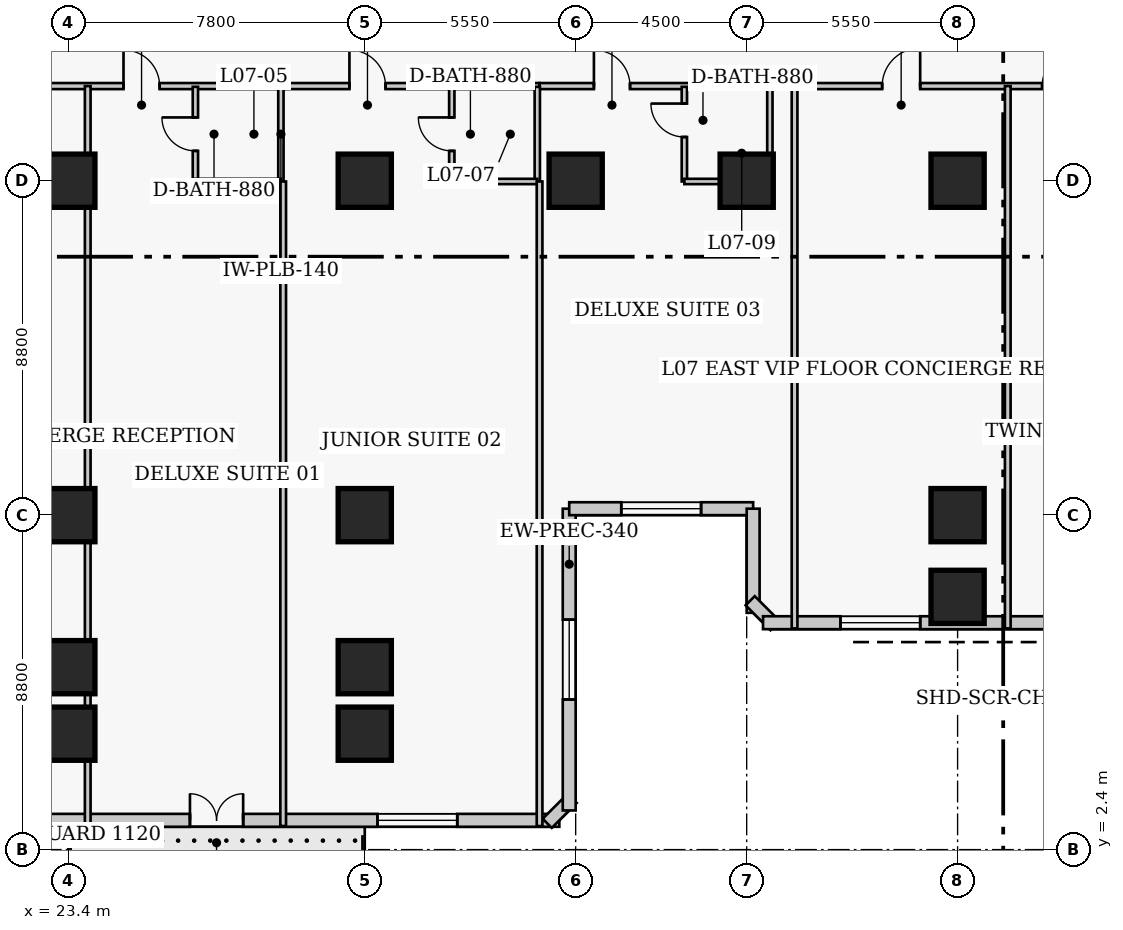
"""IFC4 building model, lengths in metres.
Left out: names, types, materials, properties, quantities, classifications, styles, units other than length and angle.
Written with IfcOpenShell. Run it as: python <this file> out.ifc"""

import sys

from ifc_helpers import new_model, si_unit, direction, frame, frame_2d, origin, origin_2d, place, context, subcontext, project, spatial, rectangle, extrude, element, fill, save


model = new_model("IFC4")
c1 = context("Model", 3, precision=1e-05, world=origin(), true_north=direction((0.0, 1.0)))
c2 = subcontext(c1, "Body", "Model", "MODEL_VIEW")
j1 = project(units=[si_unit("LENGTHUNIT", "METRE"), si_unit("PLANEANGLEUNIT", "RADIAN")], contexts=[c1])
p1 = place(None, origin())
s1 = spatial("IfcSite", under=j1, at=p1, CompositionType="ELEMENT")
p2 = place(p1, origin())
s2 = spatial("IfcBuilding", under=s1, at=p2, CompositionType="ELEMENT")
p3 = place(p2, frame((0.0, 0.0, 33.6)))
s3 = spatial("IfcBuildingStorey", under=s2, at=p3, CompositionType="ELEMENT", Elevation=33.6)
for number, where, z_axis, x_axis in (
    (1, (23.4, 11.2, 0.0), (0.0, 0.0, 1.0), (1.0, 0.0, 0.0)),
    (2, (23.4, 20.0, 0.0), (0.0, 0.0, 1.0), (1.0, 0.0, 0.0)),
    (3, (31.2, 11.2, 0.0), (0.0, 0.0, 1.0), (1.0, 0.0, 0.0)),
    (4, (31.2, 20.0, 0.0), (0.0, 0.0, 1.0), (1.0, 0.0, 0.0)),
    (5, (36.75, 20.0, 0.0), (0.0, 0.0, 1.0), (1.0, 0.0, 0.0)),
    (6, (41.25, 20.0, 0.0), (0.0, 0.0, 1.0), (1.0, 0.0, 0.0)),
    (7, (46.8, 11.2, 0.0), (0.0, 0.0, 1.0), (1.0, 0.0, 0.0)),
    (8, (46.8, 20.0, 0.0), (0.0, 0.0, 1.0), (1.0, 0.0, 0.0)),
    (9, (23.4, 7.2, 0.0), (0.0, 0.0, 1.0), (1.0, 0.0, 0.0)),
    (10, (31.2, 7.2, 0.0), (0.0, 0.0, 1.0), (1.0, 0.0, 0.0)),
    (11, (23.4, 5.45, 0.0), (0.0, 0.0, 1.0), (1.0, 0.0, 0.0)),
    (12, (31.2, 5.45, 0.0), (0.0, 0.0, 1.0), (1.0, 0.0, 0.0)),
    (13, (46.8, 9.05, 0.0), (0.0, 0.0, 1.0), (1.0, 0.0, 0.0)),
):
    element("IfcColumn", number, at=place(p3, frame(where, z_axis=z_axis, x_axis=x_axis)), inside=s3, PredefinedType="COLUMN", context=c2, shape_type="SweptSolid", body=[
        extrude(rectangle(XDim=1.4, YDim=1.4, at=origin_2d()), origin(), (0.0, 0.0, 1.0), 3.8),
    ])
p4 = place(p3, frame((6.43, 3.17, 0.0), z_axis=(0.0, 0.0, 1.0), x_axis=(1.0, 0.0, 0.0)))
e14 = element("IfcWall", 14, at=p4, inside=s3, PredefinedType="SOLIDWALL", context=c2, shape_type="SweptSolid", body=[
    extrude(rectangle(XDim=29.89, YDim=0.34, at=frame_2d((14.945, 0.0))), origin(), (0.0, 0.0, 1.0), 3.54),
])
p5 = place(p4, frame((20.17, 0.0, 0.0)))
e15 = element("IfcOpeningElement", 15, at=p5, cuts=e14, PredefinedType="OPENING", context=c2, shape_type="SweptSolid", body=[
    extrude(rectangle(XDim=1.4, YDim=2.15, at=frame_2d((0.7, 1.075))), frame((0.0, 0.18, 0.0), z_axis=(0.0, -1.0, 0.0), x_axis=(1.0, 0.0, 0.0)), (0.0, 0.0, 1.0), 0.36),
])
p6 = place(p4, frame((2.686, 0.0, 0.85)))
e16 = element("IfcOpeningElement", 16, at=p6, cuts=e14, PredefinedType="OPENING", context=c2, shape_type="SweptSolid", body=[
    extrude(rectangle(XDim=2.1, YDim=1.85, at=frame_2d((1.05, 0.925))), frame((0.0, 0.18, 0.0), z_axis=(0.0, -1.0, 0.0), x_axis=(1.0, 0.0, 0.0)), (0.0, 0.0, 1.0), 0.36),
])
p7 = place(p4, frame((10.809, 0.0, 0.85)))
e17 = element("IfcOpeningElement", 17, at=p7, cuts=e14, PredefinedType="OPENING", context=c2, shape_type="SweptSolid", body=[
    extrude(rectangle(XDim=2.1, YDim=1.85, at=frame_2d((1.05, 0.925))), frame((0.0, 0.18, 0.0), z_axis=(0.0, -1.0, 0.0), x_axis=(1.0, 0.0, 0.0)), (0.0, 0.0, 1.0), 0.36),
])
p8 = place(p4, frame((25.104, 0.0, 0.85)))
e18 = element("IfcOpeningElement", 18, at=p8, cuts=e14, PredefinedType="OPENING", context=c2, shape_type="SweptSolid", body=[
    extrude(rectangle(XDim=2.1, YDim=1.85, at=frame_2d((1.05, 0.925))), frame((0.0, 0.18, 0.0), z_axis=(0.0, -1.0, 0.0), x_axis=(1.0, 0.0, 0.0)), (0.0, 0.0, 1.0), 0.36),
])
p9 = place(p3, frame((36.001, 3.092, 0.0), z_axis=(0.0, 0.0, 1.0), x_axis=(0.707106781187, 0.707106781187, 0.0)))
e19 = element("IfcWall", 19, at=p9, inside=s3, PredefinedType="SOLIDWALL", context=c2, shape_type="SweptSolid", body=[
    extrude(rectangle(XDim=0.929, YDim=0.34, at=frame_2d((0.464, 0.0))), origin(), (0.0, 0.0, 1.0), 3.54),
])
p10 = place(p3, frame((36.58, 3.43, 0.0), z_axis=(0.0, 0.0, 1.0), x_axis=(0.0, 1.0, 0.0)))
e20 = element("IfcWall", 20, at=p10, inside=s3, PredefinedType="SOLIDWALL", context=c2, shape_type="SweptSolid", body=[
    extrude(rectangle(XDim=7.94, YDim=0.34, at=frame_2d((3.97, 0.0))), origin(), (0.0, 0.0, 1.0), 3.54),
])
p11 = place(p10, frame((2.92, 0.0, 0.85)))
e21 = element("IfcOpeningElement", 21, at=p11, cuts=e20, PredefinedType="OPENING", context=c2, shape_type="SweptSolid", body=[
    extrude(rectangle(XDim=2.1, YDim=1.85, at=frame_2d((1.05, 0.925))), frame((0.0, 0.18, 0.0), z_axis=(0.0, -1.0, 0.0), x_axis=(1.0, 0.0, 0.0)), (0.0, 0.0, 1.0), 0.36),
])
p12 = place(p3, frame((36.58, 11.37, 0.0), z_axis=(0.0, 0.0, 1.0), x_axis=(1.0, 0.0, 0.0)))
e22 = element("IfcWall", 22, at=p12, inside=s3, PredefinedType="SOLIDWALL", context=c2, shape_type="SweptSolid", body=[
    extrude(rectangle(XDim=4.84, YDim=0.34, at=frame_2d((2.42, 0.0))), origin(), (0.0, 0.0, 1.0), 3.54),
])
p13 = place(p12, frame((1.37, 0.0, 0.85)))
e23 = element("IfcOpeningElement", 23, at=p13, cuts=e22, PredefinedType="OPENING", context=c2, shape_type="SweptSolid", body=[
    extrude(rectangle(XDim=2.1, YDim=1.85, at=frame_2d((1.05, 0.925))), frame((0.0, 0.18, 0.0), z_axis=(0.0, -1.0, 0.0), x_axis=(1.0, 0.0, 0.0)), (0.0, 0.0, 1.0), 0.36),
])
p14 = place(p3, frame((41.42, 11.37, 0.0), z_axis=(0.0, 0.0, 1.0), x_axis=(0.0, -1.0, 0.0)))
e24 = element("IfcWall", 24, at=p14, inside=s3, PredefinedType="SOLIDWALL", context=c2, shape_type="SweptSolid", body=[
    extrude(rectangle(XDim=2.74, YDim=0.34, at=frame_2d((1.37, 0.0))), origin(), (0.0, 0.0, 1.0), 3.54),
])
p15 = place(p3, frame((41.342, 8.948, 0.0), z_axis=(0.0, 0.0, 1.0), x_axis=(0.707238225886, -0.706975312048, 0.0)))
e25 = element("IfcWall", 25, at=p15, inside=s3, PredefinedType="SOLIDWALL", context=c2, shape_type="SweptSolid", body=[
    extrude(rectangle(XDim=0.929, YDim=0.34, at=frame_2d((0.464, 0.0))), origin(), (0.0, 0.0, 1.0), 3.54),
])
p16 = place(p3, frame((41.68, 8.37, 0.0), z_axis=(0.0, 0.0, 1.0), x_axis=(1.0, 0.0, 0.0)))
e26 = element("IfcWall", 26, at=p16, inside=s3, PredefinedType="SOLIDWALL", context=c2, shape_type="SweptSolid", body=[
    extrude(rectangle(XDim=29.89, YDim=0.34, at=frame_2d((14.945, 0.0))), origin(), (0.0, 0.0, 1.0), 3.54),
])
p17 = place(p16, frame((2.036, 0.0, 0.85)))
e27 = element("IfcOpeningElement", 27, at=p17, cuts=e26, PredefinedType="OPENING", context=c2, shape_type="SweptSolid", body=[
    extrude(rectangle(XDim=2.1, YDim=1.85, at=frame_2d((1.05, 0.925))), frame((0.0, 0.18, 0.0), z_axis=(0.0, -1.0, 0.0), x_axis=(1.0, 0.0, 0.0)), (0.0, 0.0, 1.0), 0.36),
])
p18 = place(p16, frame((9.009, 0.0, 0.85)))
e28 = element("IfcOpeningElement", 28, at=p18, cuts=e26, PredefinedType="OPENING", context=c2, shape_type="SweptSolid", body=[
    extrude(rectangle(XDim=2.1, YDim=1.85, at=frame_2d((1.05, 0.925))), frame((0.0, 0.18, 0.0), z_axis=(0.0, -1.0, 0.0), x_axis=(1.0, 0.0, 0.0)), (0.0, 0.0, 1.0), 0.36),
])
p19 = place(p16, frame((26.254, 0.0, 0.85)))
e29 = element("IfcOpeningElement", 29, at=p19, cuts=e26, PredefinedType="OPENING", context=c2, shape_type="SweptSolid", body=[
    extrude(rectangle(XDim=2.1, YDim=1.85, at=frame_2d((1.05, 0.925))), frame((0.0, 0.18, 0.0), z_axis=(0.0, -1.0, 0.0), x_axis=(1.0, 0.0, 0.0)), (0.0, 0.0, 1.0), 0.36),
])
p20 = place(p16, frame((13.845, 0.0, 0.85)))
e30 = element("IfcOpeningElement", 30, at=p20, cuts=e26, PredefinedType="OPENING", context=c2, shape_type="SweptSolid", body=[
    extrude(rectangle(XDim=1.3, YDim=1.7, at=frame_2d((0.65, 0.85))), frame((0.0, 0.18, 0.0), z_axis=(0.0, -1.0, 0.0), x_axis=(1.0, 0.0, 0.0)), (0.0, 0.0, 1.0), 0.36),
])
p21 = place(p3, frame((18.8, 22.49, 0.0), z_axis=(0.0, 0.0, 1.0), x_axis=(1.0, 0.0, 0.0)))
e31 = element("IfcWall", 31, at=p21, inside=s3, PredefinedType="PARTITIONING", context=c2, shape_type="SweptSolid", body=[
    extrude(rectangle(XDim=17.0, YDim=0.16, at=frame_2d((8.5, 0.0))), origin(), (0.0, 0.0, 1.0), 3.54),
])
p22 = place(p21, frame((2.085, 0.0, 0.0)))
e32 = element("IfcOpeningElement", 32, at=p22, cuts=e31, PredefinedType="OPENING", context=c2, shape_type="SweptSolid", body=[
    extrude(rectangle(XDim=1.0, YDim=2.15, at=frame_2d((0.5, 1.075))), frame((0.0, 0.09, 0.0), z_axis=(0.0, -1.0, 0.0), x_axis=(1.0, 0.0, 0.0)), (0.0, 0.0, 1.0), 0.18),
])
p23 = place(p21, frame((6.052, 0.0, 0.0)))
e33 = element("IfcOpeningElement", 33, at=p23, cuts=e31, PredefinedType="OPENING", context=c2, shape_type="SweptSolid", body=[
    extrude(rectangle(XDim=0.95, YDim=2.1, at=frame_2d((0.475, 1.05))), frame((0.0, 0.09, 0.0), z_axis=(0.0, -1.0, 0.0), x_axis=(1.0, 0.0, 0.0)), (0.0, 0.0, 1.0), 0.18),
])
p24 = place(p21, frame((11.997, 0.0, 0.0)))
e34 = element("IfcOpeningElement", 34, at=p24, cuts=e31, PredefinedType="OPENING", context=c2, shape_type="SweptSolid", body=[
    extrude(rectangle(XDim=0.95, YDim=2.1, at=frame_2d((0.475, 1.05))), frame((0.0, 0.09, 0.0), z_axis=(0.0, -1.0, 0.0), x_axis=(1.0, 0.0, 0.0)), (0.0, 0.0, 1.0), 0.18),
])
p25 = place(p3, frame((35.8, 22.49, 0.0), z_axis=(0.0, 0.0, 1.0), x_axis=(1.0, 0.0, 0.0)))
e35 = element("IfcWall", 35, at=p25, inside=s3, PredefinedType="PARTITIONING", context=c2, shape_type="SweptSolid", body=[
    extrude(rectangle(XDim=22.5, YDim=0.16, at=frame_2d((11.25, 0.0))), origin(), (0.0, 0.0, 1.0), 3.54),
])
p26 = place(p25, frame((1.43, 0.0, 0.0)))
e36 = element("IfcOpeningElement", 36, at=p26, cuts=e35, PredefinedType="OPENING", context=c2, shape_type="SweptSolid", body=[
    extrude(rectangle(XDim=0.95, YDim=2.1, at=frame_2d((0.475, 1.05))), frame((0.0, 0.09, 0.0), z_axis=(0.0, -1.0, 0.0), x_axis=(1.0, 0.0, 0.0)), (0.0, 0.0, 1.0), 0.18),
])
p27 = place(p25, frame((9.015, 0.0, 0.0)))
e37 = element("IfcOpeningElement", 37, at=p27, cuts=e35, PredefinedType="OPENING", context=c2, shape_type="SweptSolid", body=[
    extrude(rectangle(XDim=1.0, YDim=2.15, at=frame_2d((0.5, 1.075))), frame((0.0, 0.09, 0.0), z_axis=(0.0, -1.0, 0.0), x_axis=(1.0, 0.0, 0.0)), (0.0, 0.0, 1.0), 0.18),
])
p28 = place(p25, frame((13.225, 0.0, 0.0)))
e38 = element("IfcOpeningElement", 38, at=p28, cuts=e35, PredefinedType="OPENING", context=c2, shape_type="SweptSolid", body=[
    extrude(rectangle(XDim=0.95, YDim=2.1, at=frame_2d((0.475, 1.05))), frame((0.0, 0.09, 0.0), z_axis=(0.0, -1.0, 0.0), x_axis=(1.0, 0.0, 0.0)), (0.0, 0.0, 1.0), 0.18),
])
p29 = place(p25, frame((18.285, 0.0, 0.0)))
e39 = element("IfcOpeningElement", 39, at=p29, cuts=e35, PredefinedType="OPENING", context=c2, shape_type="SweptSolid", body=[
    extrude(rectangle(XDim=0.95, YDim=2.1, at=frame_2d((0.475, 1.05))), frame((0.0, 0.09, 0.0), z_axis=(0.0, -1.0, 0.0), x_axis=(1.0, 0.0, 0.0)), (0.0, 0.0, 1.0), 0.18),
])
p30 = place(p3, frame((23.91, 3.02, 0.0), z_axis=(0.0, 0.0, 1.0), x_axis=(0.0, 1.0, 0.0)))
e40 = element("IfcWall", 40, at=p30, inside=s3, PredefinedType="PARTITIONING", context=c2, shape_type="SweptSolid", body=[
    extrude(rectangle(XDim=19.47, YDim=0.15, at=frame_2d((9.735, 0.0))), origin(), (0.0, 0.0, 1.0), 3.54),
])
p31 = place(p3, frame((26.743, 19.98, 0.0), z_axis=(0.0, 0.0, 1.0), x_axis=(0.0, 1.0, 0.0)))
e41 = element("IfcWall", 41, at=p31, inside=s3, PredefinedType="PLUMBINGWALL", context=c2, shape_type="SweptSolid", body=[
    extrude(rectangle(XDim=2.49, YDim=0.14, at=frame_2d((1.245, 0.0))), origin(), (0.0, 0.0, 1.0), 3.54),
])
p32 = place(p31, frame((0.805, 0.0, 0.0)))
e42 = element("IfcOpeningElement", 42, at=p32, cuts=e41, PredefinedType="OPENING", context=c2, shape_type="SweptSolid", body=[
    extrude(rectangle(XDim=0.88, YDim=2.05, at=frame_2d((0.44, 1.025))), frame((0.0, 0.08, 0.0), z_axis=(0.0, -1.0, 0.0), x_axis=(1.0, 0.0, 0.0)), (0.0, 0.0, 1.0), 0.16),
])
p33 = place(p3, frame((28.993, 19.98, 0.0), z_axis=(0.0, 0.0, 1.0), x_axis=(0.0, 1.0, 0.0)))
e43 = element("IfcWall", 43, at=p33, inside=s3, PredefinedType="PLUMBINGWALL", context=c2, shape_type="SweptSolid", body=[
    extrude(rectangle(XDim=2.49, YDim=0.14, at=frame_2d((1.245, 0.0))), origin(), (0.0, 0.0, 1.0), 3.54),
])
p34 = place(p3, frame((26.743, 19.98, 0.0), z_axis=(0.0, 0.0, 1.0), x_axis=(1.0, 0.0, 0.0)))
e44 = element("IfcWall", 44, at=p34, inside=s3, PredefinedType="PLUMBINGWALL", context=c2, shape_type="SweptSolid", body=[
    extrude(rectangle(XDim=2.25, YDim=0.14, at=frame_2d((1.125, 0.0))), origin(), (0.0, 0.0, 1.0), 2.593),
])
p35 = place(p3, frame((29.053, 3.02, 0.0), z_axis=(0.0, 0.0, 1.0), x_axis=(0.0, 1.0, 0.0)))
e45 = element("IfcWall", 45, at=p35, inside=s3, PredefinedType="PARTITIONING", context=c2, shape_type="SweptSolid", body=[
    extrude(rectangle(XDim=16.96, YDim=0.15, at=frame_2d((8.48, 0.0))), origin(), (0.0, 0.0, 1.0), 3.54),
])
p36 = place(p3, frame((33.49, 19.98, 0.0), z_axis=(0.0, 0.0, 1.0), x_axis=(0.0, 1.0, 0.0)))
e46 = element("IfcWall", 46, at=p36, inside=s3, PredefinedType="PLUMBINGWALL", context=c2, shape_type="SweptSolid", body=[
    extrude(rectangle(XDim=2.49, YDim=0.14, at=frame_2d((1.245, 0.0))), origin(), (0.0, 0.0, 1.0), 3.54),
])
p37 = place(p36, frame((0.805, 0.0, 0.0)))
e47 = element("IfcOpeningElement", 47, at=p37, cuts=e46, PredefinedType="OPENING", context=c2, shape_type="SweptSolid", body=[
    extrude(rectangle(XDim=0.88, YDim=2.05, at=frame_2d((0.44, 1.025))), frame((0.0, 0.08, 0.0), z_axis=(0.0, -1.0, 0.0), x_axis=(1.0, 0.0, 0.0)), (0.0, 0.0, 1.0), 0.16),
])
p38 = place(p3, frame((35.74, 19.98, 0.0), z_axis=(0.0, 0.0, 1.0), x_axis=(0.0, 1.0, 0.0)))
e48 = element("IfcWall", 48, at=p38, inside=s3, PredefinedType="PLUMBINGWALL", context=c2, shape_type="SweptSolid", body=[
    extrude(rectangle(XDim=2.49, YDim=0.14, at=frame_2d((1.245, 0.0))), origin(), (0.0, 0.0, 1.0), 3.54),
])
p39 = place(p3, frame((33.49, 19.98, 0.0), z_axis=(0.0, 0.0, 1.0), x_axis=(1.0, 0.0, 0.0)))
e49 = element("IfcWall", 49, at=p39, inside=s3, PredefinedType="PLUMBINGWALL", context=c2, shape_type="SweptSolid", body=[
    extrude(rectangle(XDim=2.25, YDim=0.14, at=frame_2d((1.125, 0.0))), origin(), (0.0, 0.0, 1.0), 2.593),
])
p40 = place(p3, frame((35.8, 3.02, 0.0), z_axis=(0.0, 0.0, 1.0), x_axis=(0.0, 1.0, 0.0)))
e50 = element("IfcWall", 50, at=p40, inside=s3, PredefinedType="PARTITIONING", context=c2, shape_type="SweptSolid", body=[
    extrude(rectangle(XDim=16.96, YDim=0.15, at=frame_2d((8.48, 0.0))), origin(), (0.0, 0.0, 1.0), 3.54),
])
p41 = place(p3, frame((39.61, 19.98, 0.0), z_axis=(0.0, 0.0, 1.0), x_axis=(0.0, 1.0, 0.0)))
e51 = element("IfcWall", 51, at=p41, inside=s3, PredefinedType="PLUMBINGWALL", context=c2, shape_type="SweptSolid", body=[
    extrude(rectangle(XDim=2.49, YDim=0.14, at=frame_2d((1.245, 0.0))), origin(), (0.0, 0.0, 1.0), 3.54),
])
p42 = place(p41, frame((1.17, 0.0, 0.0)))
e52 = element("IfcOpeningElement", 52, at=p42, cuts=e51, PredefinedType="OPENING", context=c2, shape_type="SweptSolid", body=[
    extrude(rectangle(XDim=0.88, YDim=2.05, at=frame_2d((0.44, 1.025))), frame((0.0, 0.08, 0.0), z_axis=(0.0, -1.0, 0.0), x_axis=(1.0, 0.0, 0.0)), (0.0, 0.0, 1.0), 0.16),
])
p43 = place(p3, frame((41.86, 19.98, 0.0), z_axis=(0.0, 0.0, 1.0), x_axis=(0.0, 1.0, 0.0)))
e53 = element("IfcWall", 53, at=p43, inside=s3, PredefinedType="PLUMBINGWALL", context=c2, shape_type="SweptSolid", body=[
    extrude(rectangle(XDim=2.49, YDim=0.14, at=frame_2d((1.245, 0.0))), origin(), (0.0, 0.0, 1.0), 3.54),
])
p44 = place(p3, frame((39.61, 19.98, 0.0), z_axis=(0.0, 0.0, 1.0), x_axis=(1.0, 0.0, 0.0)))
e54 = element("IfcWall", 54, at=p44, inside=s3, PredefinedType="PLUMBINGWALL", context=c2, shape_type="SweptSolid", body=[
    extrude(rectangle(XDim=2.25, YDim=0.14, at=frame_2d((1.125, 0.0))), origin(), (0.0, 0.0, 1.0), 2.593),
])
for number, where, z_axis, x_axis in (
    (55, (42.51, 8.22, 0.0), (0.0, 0.0, 1.0), (0.0, 1.0, 0.0)),
    (56, (48.12, 8.22, 0.0), (0.0, 0.0, 1.0), (0.0, 1.0, 0.0)),
):
    element("IfcWall", number, at=place(p3, frame(where, z_axis=z_axis, x_axis=x_axis)), inside=s3, PredefinedType="PARTITIONING", context=c2, shape_type="SweptSolid", body=[
        extrude(rectangle(XDim=14.27, YDim=0.15, at=frame_2d((7.135, 0.0))), origin(), (0.0, 0.0, 1.0), 3.54),
    ])
p45 = place(p5, origin())
e57 = element("IfcDoor", 57, at=p45, inside=s3, OperationType="DOUBLE_DOOR_SINGLE_SWING", PredefinedType="DOOR", context=c2, shape_type="SweptSolid", body=[
    extrude(rectangle(XDim=1.4, YDim=2.15, at=frame_2d((0.7, 1.075))), frame((0.0, 0.025, 0.0), z_axis=(0.0, -1.0, 0.0), x_axis=(1.0, 0.0, 0.0)), (0.0, 0.0, 1.0), 0.05),
])
fill(e15, e57)
p46 = place(p8, origin())
e58 = element("IfcWindow", 58, at=p46, inside=s3, PartitioningType="SINGLE_PANEL", PredefinedType="WINDOW", context=c2, shape_type="SweptSolid", body=[
    extrude(rectangle(XDim=2.1, YDim=1.85, at=frame_2d((1.05, 0.925))), frame((0.0, 0.03, 0.0), z_axis=(0.0, -1.0, 0.0), x_axis=(1.0, 0.0, 0.0)), (0.0, 0.0, 1.0), 0.06),
])
fill(e18, e58)
p47 = place(p11, origin())
e59 = element("IfcWindow", 59, at=p47, inside=s3, PartitioningType="SINGLE_PANEL", PredefinedType="WINDOW", context=c2, shape_type="SweptSolid", body=[
    extrude(rectangle(XDim=2.1, YDim=1.85, at=frame_2d((1.05, 0.925))), frame((0.0, 0.03, 0.0), z_axis=(0.0, -1.0, 0.0), x_axis=(1.0, 0.0, 0.0)), (0.0, 0.0, 1.0), 0.06),
])
fill(e21, e59)
p48 = place(p13, origin())
e60 = element("IfcWindow", 60, at=p48, inside=s3, PartitioningType="SINGLE_PANEL", PredefinedType="WINDOW", context=c2, shape_type="SweptSolid", body=[
    extrude(rectangle(XDim=2.1, YDim=1.85, at=frame_2d((1.05, 0.925))), frame((0.0, 0.03, 0.0), z_axis=(0.0, -1.0, 0.0), x_axis=(1.0, 0.0, 0.0)), (0.0, 0.0, 1.0), 0.06),
])
fill(e23, e60)
p49 = place(p17, origin())
e61 = element("IfcWindow", 61, at=p49, inside=s3, PartitioningType="SINGLE_PANEL", PredefinedType="WINDOW", context=c2, shape_type="SweptSolid", body=[
    extrude(rectangle(XDim=2.1, YDim=1.85, at=frame_2d((1.05, 0.925))), frame((0.0, 0.03, 0.0), z_axis=(0.0, -1.0, 0.0), x_axis=(1.0, 0.0, 0.0)), (0.0, 0.0, 1.0), 0.06),
])
fill(e27, e61)
p50 = place(p32, origin())
e62 = element("IfcDoor", 62, at=p50, inside=s3, OperationType="SINGLE_SWING_RIGHT", PredefinedType="DOOR", context=c2, shape_type="SweptSolid", body=[
    extrude(rectangle(XDim=0.88, YDim=2.05, at=frame_2d((0.44, 1.025))), frame((0.0, 0.025, 0.0), z_axis=(0.0, -1.0, 0.0), x_axis=(1.0, 0.0, 0.0)), (0.0, 0.0, 1.0), 0.05),
])
fill(e42, e62)
p51 = place(p23, origin())
e63 = element("IfcDoor", 63, at=p51, inside=s3, OperationType="SINGLE_SWING_LEFT", PredefinedType="DOOR", context=c2, shape_type="SweptSolid", body=[
    extrude(rectangle(XDim=0.95, YDim=2.1, at=frame_2d((0.475, 1.05))), frame((0.0, 0.025, 0.0), z_axis=(0.0, -1.0, 0.0), x_axis=(1.0, 0.0, 0.0)), (0.0, 0.0, 1.0), 0.05),
])
fill(e33, e63)
p52 = place(p37, origin())
e64 = element("IfcDoor", 64, at=p52, inside=s3, OperationType="SINGLE_SWING_RIGHT", PredefinedType="DOOR", context=c2, shape_type="SweptSolid", body=[
    extrude(rectangle(XDim=0.88, YDim=2.05, at=frame_2d((0.44, 1.025))), frame((0.0, 0.025, 0.0), z_axis=(0.0, -1.0, 0.0), x_axis=(1.0, 0.0, 0.0)), (0.0, 0.0, 1.0), 0.05),
])
fill(e47, e64)
p53 = place(p24, origin())
e65 = element("IfcDoor", 65, at=p53, inside=s3, OperationType="SINGLE_SWING_LEFT", PredefinedType="DOOR", context=c2, shape_type="SweptSolid", body=[
    extrude(rectangle(XDim=0.95, YDim=2.1, at=frame_2d((0.475, 1.05))), frame((0.0, 0.025, 0.0), z_axis=(0.0, -1.0, 0.0), x_axis=(1.0, 0.0, 0.0)), (0.0, 0.0, 1.0), 0.05),
])
fill(e34, e65)
p54 = place(p42, origin())
e66 = element("IfcDoor", 66, at=p54, inside=s3, OperationType="SINGLE_SWING_RIGHT", PredefinedType="DOOR", context=c2, shape_type="SweptSolid", body=[
    extrude(rectangle(XDim=0.88, YDim=2.05, at=frame_2d((0.44, 1.025))), frame((0.0, 0.025, 0.0), z_axis=(0.0, -1.0, 0.0), x_axis=(1.0, 0.0, 0.0)), (0.0, 0.0, 1.0), 0.05),
])
fill(e52, e66)
p55 = place(p26, origin())
e67 = element("IfcDoor", 67, at=p55, inside=s3, OperationType="SINGLE_SWING_LEFT", PredefinedType="DOOR", context=c2, shape_type="SweptSolid", body=[
    extrude(rectangle(XDim=0.95, YDim=2.1, at=frame_2d((0.475, 1.05))), frame((0.0, 0.025, 0.0), z_axis=(0.0, -1.0, 0.0), x_axis=(1.0, 0.0, 0.0)), (0.0, 0.0, 1.0), 0.05),
])
fill(e36, e67)
p56 = place(p27, origin())
e68 = element("IfcDoor", 68, at=p56, inside=s3, OperationType="SINGLE_SWING_RIGHT", PredefinedType="DOOR", context=c2, shape_type="SweptSolid", body=[
    extrude(rectangle(XDim=1.0, YDim=2.15, at=frame_2d((0.5, 1.075))), frame((0.0, 0.025, 0.0), z_axis=(0.0, -1.0, 0.0), x_axis=(1.0, 0.0, 0.0)), (0.0, 0.0, 1.0), 0.05),
])
fill(e37, e68)
p57 = place(p28, origin())
e69 = element("IfcDoor", 69, at=p57, inside=s3, OperationType="SINGLE_SWING_RIGHT", PredefinedType="DOOR", context=c2, shape_type="SweptSolid", body=[
    extrude(rectangle(XDim=0.95, YDim=2.1, at=frame_2d((0.475, 1.05))), frame((0.0, 0.025, 0.0), z_axis=(0.0, -1.0, 0.0), x_axis=(1.0, 0.0, 0.0)), (0.0, 0.0, 1.0), 0.05),
])
fill(e38, e69)
save(model, sys.argv[1])
